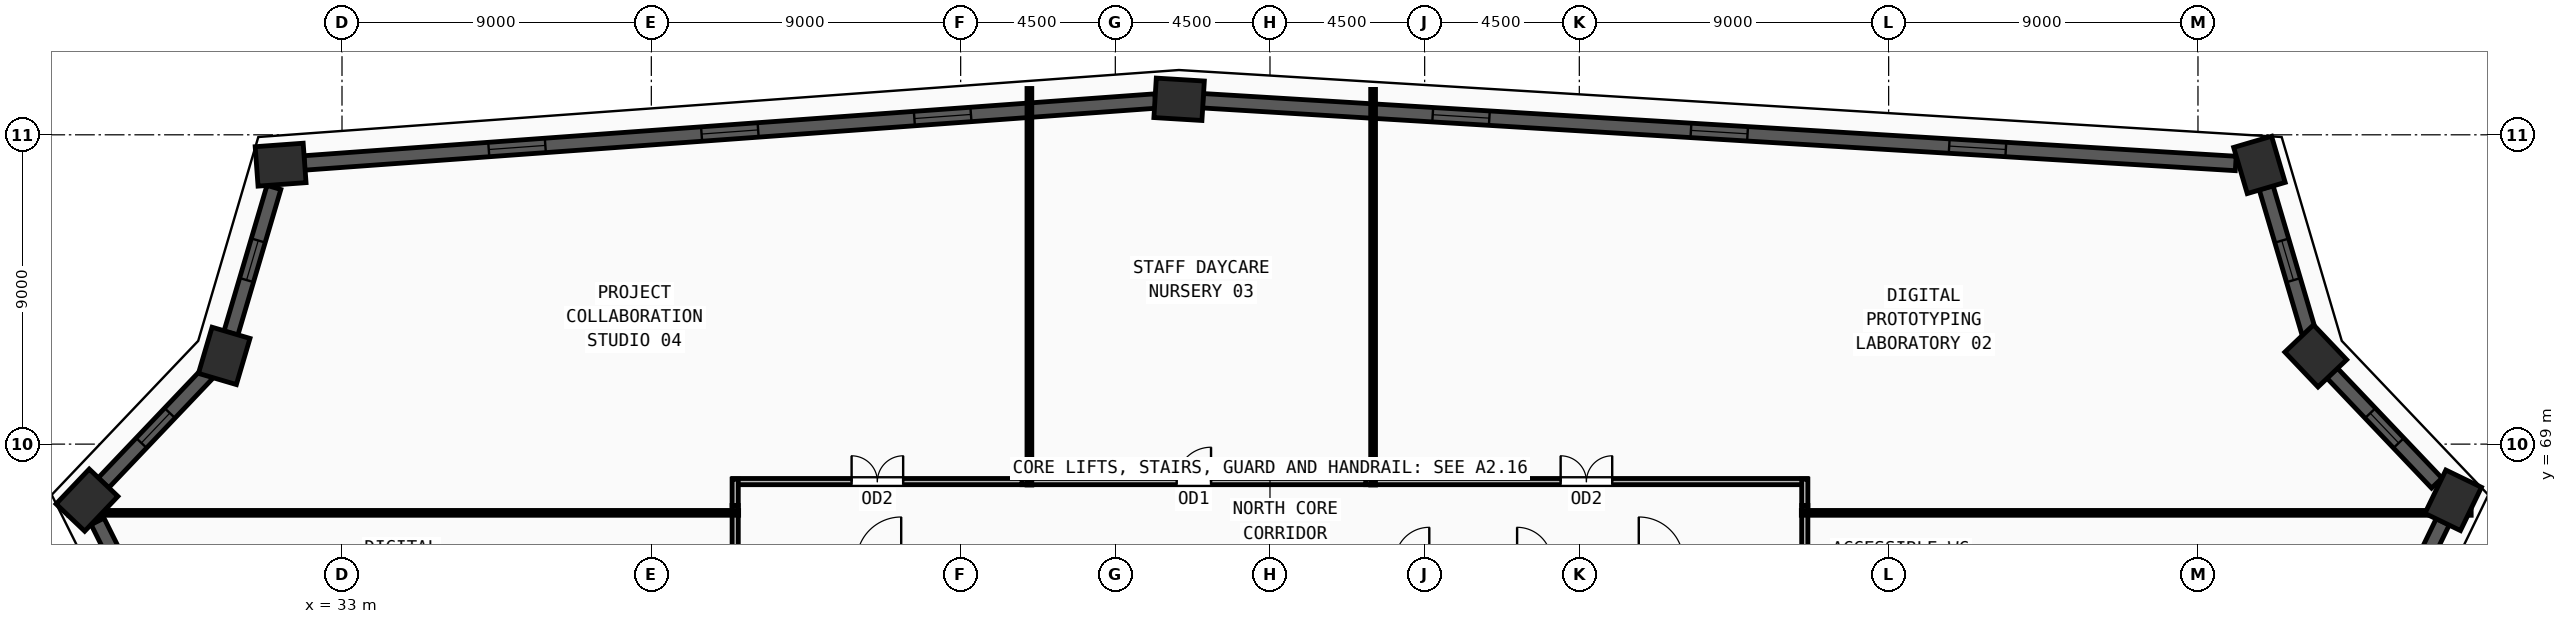
"""IFC4 building model, lengths in metres.
Left out: names, types, materials, properties, quantities, classifications, styles, units other than length and angle.
Written with IfcOpenShell. Run it as: python <this file> out.ifc"""

import sys

from ifc_helpers import new_model, si_unit, direction, frame, frame_2d, origin, origin_2d, place, context, subcontext, project, spatial, rectangle, extrude, source, transform, mapped, element, fill, save


model = new_model("IFC4")
c1 = context("Model", 3, precision=1e-05, world=origin(), true_north=direction((0.0, 1.0)))
c2 = subcontext(c1, "Body", "Model", "MODEL_VIEW")
j1 = project(units=[si_unit("LENGTHUNIT", "METRE"), si_unit("PLANEANGLEUNIT", "RADIAN")], contexts=[c1])
p1 = place(None, origin())
s1 = spatial("IfcSite", under=j1, at=p1, CompositionType="ELEMENT")
p2 = place(p1, origin())
s2 = spatial("IfcBuilding", under=s1, at=p2, CompositionType="ELEMENT")
p3 = place(p2, frame((0.0, 0.0, 177.75)))
s3 = spatial("IfcBuildingStorey", under=s2, at=p3, CompositionType="ELEMENT", Elevation=177.75)
m1 = source(origin(), c2, "Body", "SweptSolid", [
    extrude(rectangle(XDim=1.4, YDim=1.15, at=origin_2d()), origin(), (0.0, 0.0, 1.0), 3.75),
])
for number, where, z_axis, x_axis in (
    (1, (25.58, 67.37, 0.0), (0.0, 0.0, 1.0), (0.689, 0.724, 0.0)),
    (2, (29.573, 71.567, 0.0), (0.0, 0.0, 1.0), (0.283, 0.959, 0.0)),
    (3, (31.214, 77.131, 0.0), (0.0, 0.0, 1.0), (0.997, 0.073, 0.0)),
    (4, (57.356, 79.033, 0.0), (0.0, 0.0, 1.0), (-0.998, 0.061, 0.0)),
    (5, (88.788, 77.124, 0.0), (0.0, 0.0, 1.0), (-0.283, 0.959, 0.0)),
    (6, (90.427, 71.567, 0.0), (0.0, 0.0, 1.0), (-0.689, 0.724, 0.0)),
    (7, (94.425, 67.365, 0.0), (0.0, 0.0, 1.0), (0.436, 0.9, 0.0)),
):
    element("IfcColumn", number, at=place(p3, frame(where, z_axis=z_axis, x_axis=x_axis)), inside=s3, PredefinedType="COLUMN", context=c2, shape_type="MappedRepresentation", body=[
        mapped(m1, transform((0.0, 0.0, 0.0), x_axis=(1.0, 0.0, 0.0), y_axis=(0.0, 1.0, 0.0), z_axis=(0.0, 0.0, 1.0), scale=1.0)),
    ])
p4 = place(p3, frame((83.303, 44.395, 0.0), z_axis=(0.0, 0.0, 1.0), x_axis=(0.435791696433, 0.90004755281, 0.0)))
e8 = element("IfcWall", 8, at=p4, inside=s3, PredefinedType="SOLIDWALL", context=c2, shape_type="SweptSolid", body=[
    extrude(rectangle(XDim=24.831, YDim=0.42, at=frame_2d((12.416, 0.0))), origin(), (0.0, 0.0, 1.0), 3.57),
])
m2 = source(origin(), c2, "Body", "SweptSolid", [
    extrude(rectangle(XDim=1.65, YDim=1.95, at=frame_2d((0.825, 0.975))), frame((0.0, 0.22, 0.0), z_axis=(0.0, -1.0, 0.0), x_axis=(1.0, 0.0, 0.0)), (0.0, 0.0, 1.0), 0.44),
])
p5 = place(p4, frame((5.383, 0.0, 0.55)))
e9 = element("IfcOpeningElement", 9, at=p5, cuts=e8, PredefinedType="OPENING", context=c2, shape_type="MappedRepresentation", body=[
    mapped(m2, transform((0.0, 0.0, 0.0), x_axis=(1.0, 0.0, 0.0), y_axis=(0.0, 1.0, 0.0), z_axis=(0.0, 0.0, 1.0), scale=1.0)),
])
p6 = place(p4, frame((17.798, 0.0, 0.55)))
e10 = element("IfcOpeningElement", 10, at=p6, cuts=e8, PredefinedType="OPENING", context=c2, shape_type="MappedRepresentation", body=[
    mapped(m2, transform((0.0, 0.0, 0.0), x_axis=(1.0, 0.0, 0.0), y_axis=(0.0, 1.0, 0.0), z_axis=(0.0, 0.0, 1.0), scale=1.0)),
])
p7 = place(p3, frame((93.949, 67.865, 0.0), z_axis=(0.0, 0.0, 1.0), x_axis=(-0.68923569457, 0.724537202171, 0.0)))
e11 = element("IfcWall", 11, at=p7, inside=s3, PredefinedType="SOLIDWALL", context=c2, shape_type="SweptSolid", body=[
    extrude(rectangle(XDim=4.419, YDim=0.42, at=frame_2d((2.209, 0.0))), origin(), (0.0, 0.0, 1.0), 3.57),
])
m3 = source(origin(), c2, "Body", "SweptSolid", [
    extrude(rectangle(XDim=1.2, YDim=1.9, at=frame_2d((0.6, 0.95))), frame((0.0, 0.22, 0.0), z_axis=(0.0, -1.0, 0.0), x_axis=(1.0, 0.0, 0.0)), (0.0, 0.0, 1.0), 0.44),
])
p8 = place(p7, frame((1.61, 0.0, 0.55)))
e12 = element("IfcOpeningElement", 12, at=p8, cuts=e11, PredefinedType="OPENING", context=c2, shape_type="MappedRepresentation", body=[
    mapped(m3, transform((0.0, 0.0, 0.0), x_axis=(1.0, 0.0, 0.0), y_axis=(0.0, 1.0, 0.0), z_axis=(0.0, 0.0, 1.0), scale=1.0)),
])
p9 = place(p3, frame((90.232, 72.229, 0.0), z_axis=(0.0, 0.0, 1.0), x_axis=(-0.283010794754, 0.959116723894, 0.0)))
e13 = element("IfcWall", 13, at=p9, inside=s3, PredefinedType="SOLIDWALL", context=c2, shape_type="SweptSolid", body=[
    extrude(rectangle(XDim=4.413, YDim=0.42, at=frame_2d((2.207, 0.0))), origin(), (0.0, 0.0, 1.0), 3.57),
])
p10 = place(p9, frame((1.607, 0.0, 0.55)))
e14 = element("IfcOpeningElement", 14, at=p10, cuts=e13, PredefinedType="OPENING", context=c2, shape_type="MappedRepresentation", body=[
    mapped(m3, transform((0.0, 0.0, 0.0), x_axis=(1.0, 0.0, 0.0), y_axis=(0.0, 1.0, 0.0), z_axis=(0.0, 0.0, 1.0), scale=1.0)),
])
p11 = place(p3, frame((88.099, 77.166, 0.0), z_axis=(0.0, 0.0, 1.0), x_axis=(-0.998161501753, 0.060610365596, 0.0)))
e15 = element("IfcWall", 15, at=p11, inside=s3, PredefinedType="SOLIDWALL", context=c2, shape_type="SweptSolid", body=[
    extrude(rectangle(XDim=30.11, YDim=0.42, at=frame_2d((15.055, 0.0))), origin(), (0.0, 0.0, 1.0), 3.57),
])
p12 = place(p11, frame((6.702, 0.0, 0.55)))
e16 = element("IfcOpeningElement", 16, at=p12, cuts=e15, PredefinedType="OPENING", context=c2, shape_type="MappedRepresentation", body=[
    mapped(m2, transform((0.0, 0.0, 0.0), x_axis=(1.0, 0.0, 0.0), y_axis=(0.0, 1.0, 0.0), z_axis=(0.0, 0.0, 1.0), scale=1.0)),
])
p13 = place(p11, frame((14.23, 0.0, 0.55)))
e17 = element("IfcOpeningElement", 17, at=p13, cuts=e15, PredefinedType="OPENING", context=c2, shape_type="MappedRepresentation", body=[
    mapped(m2, transform((0.0, 0.0, 0.0), x_axis=(1.0, 0.0, 0.0), y_axis=(0.0, 1.0, 0.0), z_axis=(0.0, 0.0, 1.0), scale=1.0)),
])
p14 = place(p11, frame((21.757, 0.0, 0.55)))
e18 = element("IfcOpeningElement", 18, at=p14, cuts=e15, PredefinedType="OPENING", context=c2, shape_type="MappedRepresentation", body=[
    mapped(m2, transform((0.0, 0.0, 0.0), x_axis=(1.0, 0.0, 0.0), y_axis=(0.0, 1.0, 0.0), z_axis=(0.0, 0.0, 1.0), scale=1.0)),
])
p15 = place(p3, frame((56.668, 78.983, 0.0), z_axis=(0.0, 0.0, 1.0), x_axis=(-0.997363346267, -0.07256965979, 0.0)))
e19 = element("IfcWall", 19, at=p15, inside=s3, PredefinedType="SOLIDWALL", context=c2, shape_type="SweptSolid", body=[
    extrude(rectangle(XDim=24.831, YDim=0.42, at=frame_2d((12.416, 0.0))), origin(), (0.0, 0.0, 1.0), 3.57),
])
p16 = place(p15, frame((5.383, 0.0, 0.55)))
e20 = element("IfcOpeningElement", 20, at=p16, cuts=e19, PredefinedType="OPENING", context=c2, shape_type="MappedRepresentation", body=[
    mapped(m2, transform((0.0, 0.0, 0.0), x_axis=(1.0, 0.0, 0.0), y_axis=(0.0, 1.0, 0.0), z_axis=(0.0, 0.0, 1.0), scale=1.0)),
])
p17 = place(p15, frame((11.591, 0.0, 0.55)))
e21 = element("IfcOpeningElement", 21, at=p17, cuts=e19, PredefinedType="OPENING", context=c2, shape_type="MappedRepresentation", body=[
    mapped(m2, transform((0.0, 0.0, 0.0), x_axis=(1.0, 0.0, 0.0), y_axis=(0.0, 1.0, 0.0), z_axis=(0.0, 0.0, 1.0), scale=1.0)),
])
p18 = place(p15, frame((17.799, 0.0, 0.55)))
e22 = element("IfcOpeningElement", 22, at=p18, cuts=e19, PredefinedType="OPENING", context=c2, shape_type="MappedRepresentation", body=[
    mapped(m2, transform((0.0, 0.0, 0.0), x_axis=(1.0, 0.0, 0.0), y_axis=(0.0, 1.0, 0.0), z_axis=(0.0, 0.0, 1.0), scale=1.0)),
])
p19 = place(p3, frame((31.019, 76.469, 0.0), z_axis=(0.0, 0.0, 1.0), x_axis=(-0.282982489087, -0.959125075717, 0.0)))
e23 = element("IfcWall", 23, at=p19, inside=s3, PredefinedType="SOLIDWALL", context=c2, shape_type="SweptSolid", body=[
    extrude(rectangle(XDim=4.421, YDim=0.42, at=frame_2d((2.21, 0.0))), origin(), (0.0, 0.0, 1.0), 3.57),
])
p20 = place(p19, frame((1.61, 0.0, 0.55)))
e24 = element("IfcOpeningElement", 24, at=p20, cuts=e23, PredefinedType="OPENING", context=c2, shape_type="MappedRepresentation", body=[
    mapped(m3, transform((0.0, 0.0, 0.0), x_axis=(1.0, 0.0, 0.0), y_axis=(0.0, 1.0, 0.0), z_axis=(0.0, 0.0, 1.0), scale=1.0)),
])
p21 = place(p3, frame((29.097, 71.067, 0.0), z_axis=(0.0, 0.0, 1.0), x_axis=(-0.689235021259, -0.724537842676, 0.0)))
e25 = element("IfcWall", 25, at=p21, inside=s3, PredefinedType="SOLIDWALL", context=c2, shape_type="SweptSolid", body=[
    extrude(rectangle(XDim=4.412, YDim=0.42, at=frame_2d((2.206, 0.0))), origin(), (0.0, 0.0, 1.0), 3.57),
])
p22 = place(p21, frame((1.606, 0.0, 0.55)))
e26 = element("IfcOpeningElement", 26, at=p22, cuts=e25, PredefinedType="OPENING", context=c2, shape_type="MappedRepresentation", body=[
    mapped(m3, transform((0.0, 0.0, 0.0), x_axis=(1.0, 0.0, 0.0), y_axis=(0.0, 1.0, 0.0), z_axis=(0.0, 0.0, 1.0), scale=1.0)),
])
p23 = place(p3, frame((25.888, 66.753, 0.0), z_axis=(0.0, 0.0, 1.0), x_axis=(0.446538896614, -0.894764222469, 0.0)))
e27 = element("IfcWall", 27, at=p23, inside=s3, PredefinedType="SOLIDWALL", context=c2, shape_type="SweptSolid", body=[
    extrude(rectangle(XDim=30.112, YDim=0.42, at=frame_2d((15.056, 0.0))), origin(), (0.0, 0.0, 1.0), 3.57),
])
p24 = place(p23, frame((6.703, 0.0, 0.55)))
e28 = element("IfcOpeningElement", 28, at=p24, cuts=e27, PredefinedType="OPENING", context=c2, shape_type="MappedRepresentation", body=[
    mapped(m2, transform((0.0, 0.0, 0.0), x_axis=(1.0, 0.0, 0.0), y_axis=(0.0, 1.0, 0.0), z_axis=(0.0, 0.0, 1.0), scale=1.0)),
])
p25 = place(p23, frame((15.781, 0.0, 0.55)))
e29 = element("IfcOpeningElement", 29, at=p25, cuts=e27, PredefinedType="OPENING", context=c2, shape_type="MappedRepresentation", body=[
    mapped(m2, transform((0.0, 0.0, 0.0), x_axis=(1.0, 0.0, 0.0), y_axis=(0.0, 1.0, 0.0), z_axis=(0.0, 0.0, 1.0), scale=1.0)),
])
p26 = place(p23, frame((21.759, 0.0, 0.55)))
e30 = element("IfcOpeningElement", 30, at=p26, cuts=e27, PredefinedType="OPENING", context=c2, shape_type="MappedRepresentation", body=[
    mapped(m2, transform((0.0, 0.0, 0.0), x_axis=(1.0, 0.0, 0.0), y_axis=(0.0, 1.0, 0.0), z_axis=(0.0, 0.0, 1.0), scale=1.0)),
])
p27 = place(p3, frame((62.785, 67.91, 0.0), z_axis=(0.0, 0.0, 1.0), x_axis=(1.0, 0.0, 0.0)))
e31 = element("IfcWall", 31, at=p27, inside=s3, PredefinedType="PARTITIONING", context=c2, shape_type="SweptSolid", body=[
    extrude(rectangle(XDim=12.845, YDim=0.18, at=frame_2d((6.422, 0.0))), origin(), (0.0, 0.0, 1.0), 3.57),
])
m4 = source(origin(), c2, "Body", "SweptSolid", [
    extrude(rectangle(XDim=1.5, YDim=2.2, at=frame_2d((0.75, 1.1))), frame((0.0, 0.1, 0.0), z_axis=(0.0, -1.0, 0.0), x_axis=(1.0, 0.0, 0.0)), (0.0, 0.0, 1.0), 0.2),
])
p28 = place(p27, frame((5.672, 0.0, 0.0)))
e32 = element("IfcOpeningElement", 32, at=p28, cuts=e31, PredefinedType="OPENING", context=c2, shape_type="MappedRepresentation", body=[
    mapped(m4, transform((0.0, 0.0, 0.0), x_axis=(1.0, 0.0, 0.0), y_axis=(0.0, 1.0, 0.0), z_axis=(0.0, 0.0, 1.0), scale=1.0)),
])
p29 = place(p3, frame((52.785, 67.91, 0.0), z_axis=(0.0, 0.0, 1.0), x_axis=(1.0, 0.0, 0.0)))
e33 = element("IfcWall", 33, at=p29, inside=s3, PredefinedType="PARTITIONING", context=c2, shape_type="SweptSolid", body=[
    extrude(rectangle(XDim=10.0, YDim=0.18, at=frame_2d((5.0, 0.0))), origin(), (0.0, 0.0, 1.0), 3.57),
])
m5 = source(origin(), c2, "Body", "SweptSolid", [
    extrude(rectangle(XDim=1.0, YDim=2.2, at=frame_2d((0.5, 1.1))), frame((0.0, 0.1, 0.0), z_axis=(0.0, -1.0, 0.0), x_axis=(1.0, 0.0, 0.0)), (0.0, 0.0, 1.0), 0.2),
])
p30 = place(p29, frame((4.5, 0.0, 0.0)))
e34 = element("IfcOpeningElement", 34, at=p30, cuts=e33, PredefinedType="OPENING", context=c2, shape_type="MappedRepresentation", body=[
    mapped(m5, transform((0.0, 0.0, 0.0), x_axis=(1.0, 0.0, 0.0), y_axis=(0.0, 1.0, 0.0), z_axis=(0.0, 0.0, 1.0), scale=1.0)),
])
p31 = place(p3, frame((44.37, 67.91, 0.0), z_axis=(0.0, 0.0, 1.0), x_axis=(1.0, 0.0, 0.0)))
e35 = element("IfcWall", 35, at=p31, inside=s3, PredefinedType="PARTITIONING", context=c2, shape_type="SweptSolid", body=[
    extrude(rectangle(XDim=8.415, YDim=0.18, at=frame_2d((4.208, 0.0))), origin(), (0.0, 0.0, 1.0), 3.57),
])
p32 = place(p31, frame((3.457, 0.0, 0.0)))
e36 = element("IfcOpeningElement", 36, at=p32, cuts=e35, PredefinedType="OPENING", context=c2, shape_type="MappedRepresentation", body=[
    mapped(m4, transform((0.0, 0.0, 0.0), x_axis=(1.0, 0.0, 0.0), y_axis=(0.0, 1.0, 0.0), z_axis=(0.0, 0.0, 1.0), scale=1.0)),
])
p33 = place(p3, frame((44.44, 63.285, 0.0), z_axis=(0.0, 0.0, 1.0), x_axis=(0.0, 1.0, 0.0)))
e37 = element("IfcWall", 37, at=p33, inside=s3, PredefinedType="PARTITIONING", context=c2, shape_type="SweptSolid", body=[
    extrude(rectangle(XDim=3.93, YDim=0.18, at=frame_2d((1.965, 0.0))), origin(), (0.0, 0.0, 1.0), 3.57),
])
p34 = place(p33, frame((1.465, 0.0, 0.0)))
e38 = element("IfcOpeningElement", 38, at=p34, cuts=e37, PredefinedType="OPENING", context=c2, shape_type="MappedRepresentation", body=[
    mapped(m5, transform((0.0, 0.0, 0.0), x_axis=(1.0, 0.0, 0.0), y_axis=(0.0, 1.0, 0.0), z_axis=(0.0, 0.0, 1.0), scale=1.0)),
])
p35 = place(p3, frame((75.56, 67.215, 0.0), z_axis=(0.0, 0.0, 1.0), x_axis=(0.0, -1.0, 0.0)))
e39 = element("IfcWall", 39, at=p35, inside=s3, PredefinedType="PARTITIONING", context=c2, shape_type="SweptSolid", body=[
    extrude(rectangle(XDim=2.035, YDim=0.18, at=frame_2d((1.018, 0.0))), origin(), (0.0, 0.0, 1.0), 3.57),
])
for number, where, z_axis, x_axis in (
    (40, (75.56, 67.98, 0.0), (0.0, 0.0, 1.0), (0.0, -1.0, 0.0)),
    (41, (44.44, 67.215, 0.0), (0.0, 0.0, 1.0), (0.0, 1.0, 0.0)),
):
    element("IfcWall", number, at=place(p3, frame(where, z_axis=z_axis, x_axis=x_axis)), inside=s3, PredefinedType="PARTITIONING", context=c2, shape_type="SweptSolid", body=[
        extrude(rectangle(XDim=0.765, YDim=0.18, at=frame_2d((0.382, 0.0))), origin(), (0.0, 0.0, 1.0), 3.57),
    ])
p36 = place(p3, frame((44.54, 67.0, 0.0), z_axis=(0.0, 0.0, 1.0), x_axis=(-1.0, 0.0, 0.0)))
e42 = element("IfcWall", 42, at=p36, inside=s3, PredefinedType="PARTITIONING", context=c2, shape_type="SweptSolid", body=[
    extrude(rectangle(XDim=19.48, YDim=0.14, at=frame_2d((9.74, 0.0))), origin(), (0.0, 0.0, 1.0), 2.755),
])
p37 = place(p3, frame((75.46, 67.0, 0.0), z_axis=(0.0, 0.0, 1.0), x_axis=(1.0, 0.0, 0.0)))
e43 = element("IfcWall", 43, at=p37, inside=s3, PredefinedType="PARTITIONING", context=c2, shape_type="SweptSolid", body=[
    extrude(rectangle(XDim=19.489, YDim=0.14, at=frame_2d((9.745, 0.0))), origin(), (0.0, 0.0, 1.0), 2.755),
])
p38 = place(p3, frame((53.0, 67.81, 0.0), z_axis=(0.0, 0.0, 1.0), x_axis=(0.0, 1.0, 0.0)))
e44 = element("IfcWall", 44, at=p38, inside=s3, PredefinedType="PARTITIONING", context=c2, shape_type="SweptSolid", body=[
    extrude(rectangle(XDim=11.538, YDim=0.14, at=frame_2d((5.769, 0.0))), origin(), (0.0, 0.0, 1.0), 3.57),
])
p39 = place(p3, frame((63.0, 67.81, 0.0), z_axis=(0.0, 0.0, 1.0), x_axis=(0.0, 1.0, 0.0)))
e45 = element("IfcWall", 45, at=p39, inside=s3, PredefinedType="PARTITIONING", context=c2, shape_type="SweptSolid", body=[
    extrude(rectangle(XDim=11.511, YDim=0.14, at=frame_2d((5.755, 0.0))), origin(), (0.0, 0.0, 1.0), 3.57),
])
m6 = source(origin(), c2, "Body", "SweptSolid", [
    extrude(rectangle(XDim=1.2, YDim=1.9, at=frame_2d((0.6, 0.95))), frame((0.0, 0.03, 0.0), z_axis=(0.0, -1.0, 0.0), x_axis=(1.0, 0.0, 0.0)), (0.0, 0.0, 1.0), 0.06),
])
p40 = place(p8, origin())
e46 = element("IfcWindow", 46, at=p40, inside=s3, PartitioningType="SINGLE_PANEL", PredefinedType="WINDOW", context=c2, shape_type="MappedRepresentation", body=[
    mapped(m6, transform((0.0, 0.0, 0.0), x_axis=(1.0, 0.0, 0.0), y_axis=(0.0, 1.0, 0.0), z_axis=(0.0, 0.0, 1.0), scale=1.0)),
])
fill(e12, e46)
p41 = place(p10, origin())
e47 = element("IfcWindow", 47, at=p41, inside=s3, PartitioningType="SINGLE_PANEL", PredefinedType="WINDOW", context=c2, shape_type="MappedRepresentation", body=[
    mapped(m6, transform((0.0, 0.0, 0.0), x_axis=(1.0, 0.0, 0.0), y_axis=(0.0, 1.0, 0.0), z_axis=(0.0, 0.0, 1.0), scale=1.0)),
])
fill(e14, e47)
m7 = source(origin(), c2, "Body", "SweptSolid", [
    extrude(rectangle(XDim=1.65, YDim=1.95, at=frame_2d((0.825, 0.975))), frame((0.0, 0.03, 0.0), z_axis=(0.0, -1.0, 0.0), x_axis=(1.0, 0.0, 0.0)), (0.0, 0.0, 1.0), 0.06),
])
p42 = place(p12, origin())
e48 = element("IfcWindow", 48, at=p42, inside=s3, PartitioningType="DOUBLE_PANEL_VERTICAL", PredefinedType="WINDOW", context=c2, shape_type="MappedRepresentation", body=[
    mapped(m7, transform((0.0, 0.0, 0.0), x_axis=(1.0, 0.0, 0.0), y_axis=(0.0, 1.0, 0.0), z_axis=(0.0, 0.0, 1.0), scale=1.0)),
])
fill(e16, e48)
p43 = place(p13, origin())
e49 = element("IfcWindow", 49, at=p43, inside=s3, PartitioningType="DOUBLE_PANEL_VERTICAL", PredefinedType="WINDOW", context=c2, shape_type="MappedRepresentation", body=[
    mapped(m7, transform((0.0, 0.0, 0.0), x_axis=(1.0, 0.0, 0.0), y_axis=(0.0, 1.0, 0.0), z_axis=(0.0, 0.0, 1.0), scale=1.0)),
])
fill(e17, e49)
p44 = place(p14, origin())
e50 = element("IfcWindow", 50, at=p44, inside=s3, PartitioningType="DOUBLE_PANEL_VERTICAL", PredefinedType="WINDOW", context=c2, shape_type="MappedRepresentation", body=[
    mapped(m7, transform((0.0, 0.0, 0.0), x_axis=(1.0, 0.0, 0.0), y_axis=(0.0, 1.0, 0.0), z_axis=(0.0, 0.0, 1.0), scale=1.0)),
])
fill(e18, e50)
p45 = place(p16, origin())
e51 = element("IfcWindow", 51, at=p45, inside=s3, PartitioningType="DOUBLE_PANEL_VERTICAL", PredefinedType="WINDOW", context=c2, shape_type="MappedRepresentation", body=[
    mapped(m7, transform((0.0, 0.0, 0.0), x_axis=(1.0, 0.0, 0.0), y_axis=(0.0, 1.0, 0.0), z_axis=(0.0, 0.0, 1.0), scale=1.0)),
])
fill(e20, e51)
p46 = place(p17, origin())
e52 = element("IfcWindow", 52, at=p46, inside=s3, PartitioningType="DOUBLE_PANEL_VERTICAL", PredefinedType="WINDOW", context=c2, shape_type="MappedRepresentation", body=[
    mapped(m7, transform((0.0, 0.0, 0.0), x_axis=(1.0, 0.0, 0.0), y_axis=(0.0, 1.0, 0.0), z_axis=(0.0, 0.0, 1.0), scale=1.0)),
])
fill(e21, e52)
p47 = place(p18, origin())
e53 = element("IfcWindow", 53, at=p47, inside=s3, PartitioningType="DOUBLE_PANEL_VERTICAL", PredefinedType="WINDOW", context=c2, shape_type="MappedRepresentation", body=[
    mapped(m7, transform((0.0, 0.0, 0.0), x_axis=(1.0, 0.0, 0.0), y_axis=(0.0, 1.0, 0.0), z_axis=(0.0, 0.0, 1.0), scale=1.0)),
])
fill(e22, e53)
p48 = place(p20, origin())
e54 = element("IfcWindow", 54, at=p48, inside=s3, PartitioningType="SINGLE_PANEL", PredefinedType="WINDOW", context=c2, shape_type="MappedRepresentation", body=[
    mapped(m6, transform((0.0, 0.0, 0.0), x_axis=(1.0, 0.0, 0.0), y_axis=(0.0, 1.0, 0.0), z_axis=(0.0, 0.0, 1.0), scale=1.0)),
])
fill(e24, e54)
p49 = place(p22, origin())
e55 = element("IfcWindow", 55, at=p49, inside=s3, PartitioningType="SINGLE_PANEL", PredefinedType="WINDOW", context=c2, shape_type="MappedRepresentation", body=[
    mapped(m6, transform((0.0, 0.0, 0.0), x_axis=(1.0, 0.0, 0.0), y_axis=(0.0, 1.0, 0.0), z_axis=(0.0, 0.0, 1.0), scale=1.0)),
])
fill(e26, e55)
m8 = source(origin(), c2, "Body", "SweptSolid", [
    extrude(rectangle(XDim=1.5, YDim=2.2, at=frame_2d((0.75, 1.1))), frame((0.0, 0.025, 0.0), z_axis=(0.0, -1.0, 0.0), x_axis=(1.0, 0.0, 0.0)), (0.0, 0.0, 1.0), 0.05),
])
p50 = place(p28, origin())
e56 = element("IfcDoor", 56, at=p50, inside=s3, OperationType="DOUBLE_DOOR_SINGLE_SWING", PredefinedType="DOOR", context=c2, shape_type="MappedRepresentation", body=[
    mapped(m8, transform((0.0, 0.0, 0.0), x_axis=(1.0, 0.0, 0.0), y_axis=(0.0, 1.0, 0.0), z_axis=(0.0, 0.0, 1.0), scale=1.0)),
])
fill(e32, e56)
m9 = source(origin(), c2, "Body", "SweptSolid", [
    extrude(rectangle(XDim=1.0, YDim=2.2, at=frame_2d((0.5, 1.1))), frame((0.0, 0.025, 0.0), z_axis=(0.0, -1.0, 0.0), x_axis=(1.0, 0.0, 0.0)), (0.0, 0.0, 1.0), 0.05),
])
p51 = place(p30, origin())
e57 = element("IfcDoor", 57, at=p51, inside=s3, OperationType="SINGLE_SWING_RIGHT", PredefinedType="DOOR", context=c2, shape_type="MappedRepresentation", body=[
    mapped(m9, transform((0.0, 0.0, 0.0), x_axis=(1.0, 0.0, 0.0), y_axis=(0.0, 1.0, 0.0), z_axis=(0.0, 0.0, 1.0), scale=1.0)),
])
fill(e34, e57)
p52 = place(p32, origin())
e58 = element("IfcDoor", 58, at=p52, inside=s3, OperationType="DOUBLE_DOOR_SINGLE_SWING", PredefinedType="DOOR", context=c2, shape_type="MappedRepresentation", body=[
    mapped(m8, transform((0.0, 0.0, 0.0), x_axis=(1.0, 0.0, 0.0), y_axis=(0.0, 1.0, 0.0), z_axis=(0.0, 0.0, 1.0), scale=1.0)),
])
fill(e36, e58)
save(model, sys.argv[1])
